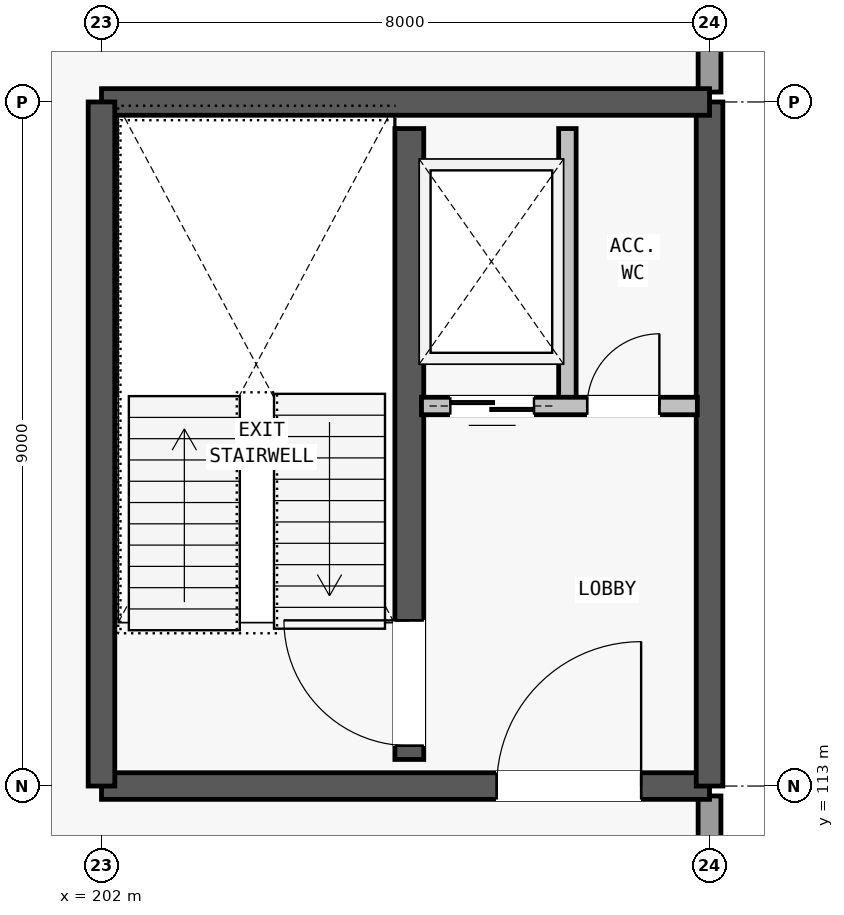
"""IFC4 building model, lengths in metres.
Left out: names, types, materials, properties, quantities, classifications, styles, units other than length and angle.
Written with IfcOpenShell. Run it as: python <this file> out.ifc"""

import sys

from ifc_helpers import new_model, si_unit, direction, frame, frame_2d, origin, place, context, subcontext, project, spatial, rectangle, extrude, element, fill, save


model = new_model("IFC4")
c1 = context("Model", 3, precision=1e-05, world=origin(), true_north=direction((0.0, 1.0)))
c2 = subcontext(c1, "Body", "Model", "MODEL_VIEW")
j1 = project(units=[si_unit("LENGTHUNIT", "METRE"), si_unit("PLANEANGLEUNIT", "RADIAN")], contexts=[c1])
p1 = place(None, origin())
s1 = spatial("IfcSite", under=j1, at=p1, CompositionType="ELEMENT")
p2 = place(p1, origin())
s2 = spatial("IfcBuilding", under=s1, at=p2, CompositionType="ELEMENT")
p3 = place(p2, frame((0.0, 0.0, 9.5)))
s3 = spatial("IfcBuildingStorey", under=s2, at=p3, CompositionType="ELEMENT", Elevation=9.5)
for number, where, z_axis, x_axis in (
    (1, (210.0, 104.305, 0.0), (0.0, 0.0, 1.0), (0.0, 1.0, 0.0)),
    (2, (210.0, 122.13, 0.0), (0.0, 0.0, 1.0), (0.0, 1.0, 0.0)),
):
    element("IfcWall", number, at=place(p3, frame(where, z_axis=z_axis, x_axis=x_axis)), inside=s3, PredefinedType="STANDARD", context=c2, shape_type="SweptSolid", body=[
        extrude(rectangle(XDim=8.565, YDim=0.3, at=frame_2d((4.283, 0.0))), origin(), (0.0, 0.0, 1.0), 2.48),
    ])
p4 = place(p3, frame((202.0, 113.0, 0.0), z_axis=(0.0, 0.0, 1.0), x_axis=(1.0, 0.0, 0.0)))
e3 = element("IfcWall", 3, at=p4, inside=s3, PredefinedType="SHEAR", context=c2, shape_type="SweptSolid", body=[
    extrude(rectangle(XDim=8.0, YDim=0.35, at=frame_2d((4.0, 0.0))), origin(), (0.0, 0.0, 1.0), 3.62),
])
p5 = place(p4, frame((5.2, 0.0, 0.0)))
e4 = element("IfcOpeningElement", 4, at=p5, cuts=e3, PredefinedType="OPENING", context=c2, shape_type="SweptSolid", body=[
    extrude(rectangle(XDim=1.9, YDim=2.3, at=frame_2d((0.95, 1.15))), frame((0.0, 0.185, 0.0), z_axis=(0.0, -1.0, 0.0), x_axis=(1.0, 0.0, 0.0)), (0.0, 0.0, 1.0), 0.37),
])
p6 = place(p3, frame((210.0, 113.0, 0.0), z_axis=(0.0, 0.0, 1.0), x_axis=(0.0, 1.0, 0.0)))
e5 = element("IfcWall", 5, at=p6, inside=s3, PredefinedType="SHEAR", context=c2, shape_type="SweptSolid", body=[
    extrude(rectangle(XDim=9.0, YDim=0.35, at=frame_2d((4.5, 0.0))), origin(), (0.0, 0.0, 1.0), 3.62),
])
p7 = place(p3, frame((210.0, 122.0, 0.0), z_axis=(0.0, 0.0, 1.0), x_axis=(-1.0, 0.0, 0.0)))
e6 = element("IfcWall", 6, at=p7, inside=s3, PredefinedType="SHEAR", context=c2, shape_type="SweptSolid", body=[
    extrude(rectangle(XDim=8.0, YDim=0.35, at=frame_2d((4.0, 0.0))), origin(), (0.0, 0.0, 1.0), 3.62),
])
p8 = place(p3, frame((202.0, 122.0, 0.0), z_axis=(0.0, 0.0, 1.0), x_axis=(0.0, -1.0, 0.0)))
e7 = element("IfcWall", 7, at=p8, inside=s3, PredefinedType="SHEAR", context=c2, shape_type="SweptSolid", body=[
    extrude(rectangle(XDim=9.0, YDim=0.35, at=frame_2d((4.5, 0.0))), origin(), (0.0, 0.0, 1.0), 3.62),
])
p9 = place(p3, frame((206.05, 113.35, 0.0), z_axis=(0.0, 0.0, 1.0), x_axis=(0.0, 1.0, 0.0)))
e8 = element("IfcWall", 8, at=p9, inside=s3, PredefinedType="SHEAR", context=c2, shape_type="SweptSolid", body=[
    extrude(rectangle(XDim=8.3, YDim=0.38, at=frame_2d((4.15, 0.0))), origin(), (0.0, 0.0, 1.0), 3.62),
])
p10 = place(p9, frame((0.18, 0.0, 0.0)))
e9 = element("IfcOpeningElement", 9, at=p10, cuts=e8, PredefinedType="OPENING", context=c2, shape_type="SweptSolid", body=[
    extrude(rectangle(XDim=1.65, YDim=2.2, at=frame_2d((0.825, 1.1))), frame((0.0, 0.2, 0.0), z_axis=(0.0, -1.0, 0.0), x_axis=(1.0, 0.0, 0.0)), (0.0, 0.0, 1.0), 0.4),
])
p11 = place(p3, frame((208.13, 118.0, 0.0), z_axis=(0.0, 0.0, 1.0), x_axis=(0.0, 1.0, 0.0)))
e10 = element("IfcWall", 10, at=p11, inside=s3, PredefinedType="PARTITIONING", context=c2, shape_type="SweptSolid", body=[
    extrude(rectangle(XDim=3.65, YDim=0.23, at=frame_2d((1.825, 0.0))), origin(), (0.0, 0.0, 1.0), 2.48),
])
p12 = place(p3, frame((206.21, 118.0, 0.0), z_axis=(0.0, 0.0, 1.0), x_axis=(1.0, 0.0, 0.0)))
e11 = element("IfcWall", 11, at=p12, inside=s3, PredefinedType="PARTITIONING", context=c2, shape_type="SweptSolid", body=[
    extrude(rectangle(XDim=3.63, YDim=0.23, at=frame_2d((1.815, 0.0))), origin(), (0.0, 0.0, 1.0), 2.48),
])
p13 = place(p12, frame((0.38, 0.0, 0.0)))
e12 = element("IfcOpeningElement", 12, at=p13, cuts=e11, PredefinedType="OPENING", context=c2, shape_type="SweptSolid", body=[
    extrude(rectangle(XDim=1.1, YDim=2.15, at=frame_2d((0.55, 1.075))), frame((0.0, 0.125, 0.0), z_axis=(0.0, -1.0, 0.0), x_axis=(1.0, 0.0, 0.0)), (0.0, 0.0, 1.0), 0.25),
])
p14 = place(p12, frame((2.18, 0.0, 0.0)))
e13 = element("IfcOpeningElement", 13, at=p14, cuts=e11, PredefinedType="OPENING", context=c2, shape_type="SweptSolid", body=[
    extrude(rectangle(XDim=0.95, YDim=2.1, at=frame_2d((0.475, 1.05))), frame((0.0, 0.125, 0.0), z_axis=(0.0, -1.0, 0.0), x_axis=(1.0, 0.0, 0.0)), (0.0, 0.0, 1.0), 0.25),
])
p15 = place(p5, origin())
e14 = element("IfcDoor", 14, at=p15, inside=s3, OperationType="SINGLE_SWING_RIGHT", PredefinedType="DOOR", context=c2, shape_type="SweptSolid", body=[
    extrude(rectangle(XDim=1.9, YDim=2.3, at=frame_2d((0.95, 1.15))), frame((0.0, 0.025, 0.0), z_axis=(0.0, -1.0, 0.0), x_axis=(1.0, 0.0, 0.0)), (0.0, 0.0, 1.0), 0.05),
])
fill(e4, e14)
p16 = place(p10, origin())
e15 = element("IfcDoor", 15, at=p16, inside=s3, OperationType="SINGLE_SWING_RIGHT", PredefinedType="DOOR", context=c2, shape_type="SweptSolid", body=[
    extrude(rectangle(XDim=1.65, YDim=2.2, at=frame_2d((0.825, 1.1))), frame((0.0, 0.025, 0.0), z_axis=(0.0, -1.0, 0.0), x_axis=(1.0, 0.0, 0.0)), (0.0, 0.0, 1.0), 0.05),
])
fill(e9, e15)
p17 = place(p13, origin())
e16 = element("IfcDoor", 16, at=p17, inside=s3, OperationType="SLIDING_TO_LEFT", PredefinedType="DOOR", context=c2, shape_type="SweptSolid", body=[
    extrude(rectangle(XDim=1.1, YDim=2.15, at=frame_2d((0.55, 1.075))), frame((0.0, 0.025, 0.0), z_axis=(0.0, -1.0, 0.0), x_axis=(1.0, 0.0, 0.0)), (0.0, 0.0, 1.0), 0.05),
])
fill(e12, e16)
p18 = place(p14, origin())
e17 = element("IfcDoor", 17, at=p18, inside=s3, OperationType="SINGLE_SWING_RIGHT", PredefinedType="DOOR", context=c2, shape_type="SweptSolid", body=[
    extrude(rectangle(XDim=0.95, YDim=2.1, at=frame_2d((0.475, 1.05))), frame((0.0, 0.025, 0.0), z_axis=(0.0, -1.0, 0.0), x_axis=(1.0, 0.0, 0.0)), (0.0, 0.0, 1.0), 0.05),
])
fill(e13, e17)
save(model, sys.argv[1])
